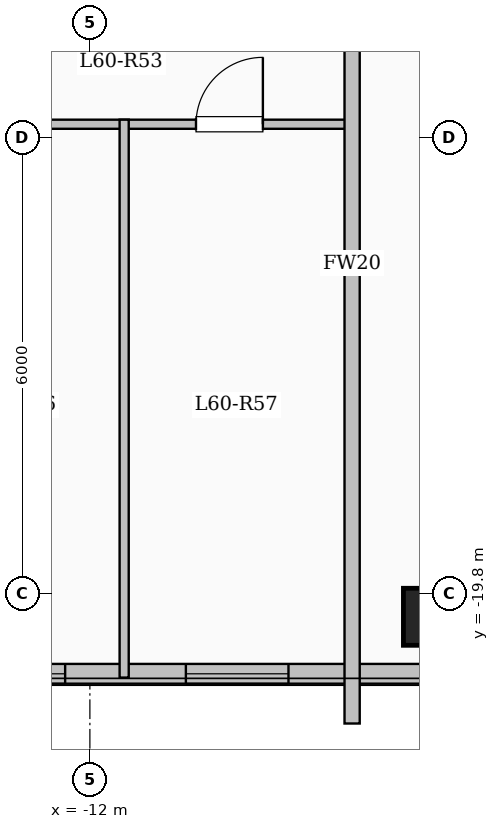
"""IFC4 building model, lengths in metres.
Left out: names, types, materials, properties, quantities, classifications, styles, units other than length and angle.
Written with IfcOpenShell. Run it as: python <this file> out.ifc"""

import sys

from ifc_helpers import new_model, si_unit, direction, frame, frame_2d, origin, origin_2d, place, context, subcontext, project, spatial, rectangle, extrude, element, fill, save


model = new_model("IFC4")
c1 = context("Model", 3, precision=1e-05, world=origin(), true_north=direction((0.0, 1.0)))
c2 = subcontext(c1, "Body", "Model", "MODEL_VIEW")
j1 = project(units=[si_unit("LENGTHUNIT", "METRE"), si_unit("PLANEANGLEUNIT", "RADIAN")], contexts=[c1])
p1 = place(None, origin())
s1 = spatial("IfcSite", under=j1, at=p1, CompositionType="ELEMENT")
p2 = place(p1, origin())
s2 = spatial("IfcBuilding", under=s1, at=p2, CompositionType="ELEMENT")
p3 = place(p2, frame((0.0, 0.0, 220.4)))
s3 = spatial("IfcBuildingStorey", under=s2, at=p3, CompositionType="ELEMENT", Elevation=220.4)
p4 = place(p3, frame((-7.5, -20.1, 0.0), z_axis=(0.0, 0.0, 1.0), x_axis=(1.0, 0.0, 0.0)))
e1 = element("IfcColumn", 1, at=p4, inside=s3, PredefinedType="COLUMN", context=c2, shape_type="SweptSolid", body=[
    extrude(rectangle(XDim=0.75, YDim=0.75, at=origin_2d()), origin(), (0.0, 0.0, 1.0), 3.35),
])
p5 = place(p3, frame((-7.35, -20.85, 0.0), z_axis=(0.0, 0.0, 1.0), x_axis=(-1.0, 0.0, 0.0)))
e2 = element("IfcWall", 2, at=p5, inside=s3, PredefinedType="SOLIDWALL", context=c2, shape_type="SweptSolid", body=[
    extrude(rectangle(XDim=11.1, YDim=0.26, at=frame_2d((5.55, 0.0))), origin(), (0.0, 0.0, 1.0), 3.1),
])
p6 = place(p5, frame((2.037, 0.0, 0.95)))
e3 = element("IfcOpeningElement", 3, at=p6, cuts=e2, PredefinedType="OPENING", context=c2, shape_type="SweptSolid", body=[
    extrude(rectangle(XDim=1.35, YDim=1.55, at=frame_2d((0.675, 0.775))), frame((0.0, 0.14, 0.0), z_axis=(0.0, -1.0, 0.0), x_axis=(1.0, 0.0, 0.0)), (0.0, 0.0, 1.0), 0.28),
])
p7 = place(p5, frame((4.976, 0.0, 0.95)))
e4 = element("IfcOpeningElement", 4, at=p7, cuts=e2, PredefinedType="OPENING", context=c2, shape_type="SweptSolid", body=[
    extrude(rectangle(XDim=1.35, YDim=1.55, at=frame_2d((0.675, 0.775))), frame((0.0, 0.14, 0.0), z_axis=(0.0, -1.0, 0.0), x_axis=(1.0, 0.0, 0.0)), (0.0, 0.0, 1.0), 0.28),
])
p8 = place(p5, frame((8.241, 0.0, 0.9)))
e5 = element("IfcOpeningElement", 5, at=p8, cuts=e2, PredefinedType="OPENING", context=c2, shape_type="SweptSolid", body=[
    extrude(rectangle(XDim=1.65, YDim=1.6, at=frame_2d((0.825, 0.8))), frame((0.0, 0.14, 0.0), z_axis=(0.0, -1.0, 0.0), x_axis=(1.0, 0.0, 0.0)), (0.0, 0.0, 1.0), 0.28),
])
p9 = place(p3, frame((-14.498, -13.62, 0.0), z_axis=(0.0, 0.0, 1.0), x_axis=(1.0, 0.0, 0.0)))
e6 = element("IfcWall", 6, at=p9, inside=s3, PredefinedType="PARTITIONING", context=c2, shape_type="SweptSolid", body=[
    extrude(rectangle(XDim=5.958, YDim=0.12, at=frame_2d((2.979, 0.0))), origin(), (0.0, 0.0, 1.0), 3.1),
])
p10 = place(p9, frame((1.005, 0.0, 0.0)))
e7 = element("IfcOpeningElement", 7, at=p10, cuts=e6, PredefinedType="OPENING", context=c2, shape_type="SweptSolid", body=[
    extrude(rectangle(XDim=0.88, YDim=2.1, at=frame_2d((0.44, 1.05))), frame((0.0, 0.07, 0.0), z_axis=(0.0, -1.0, 0.0), x_axis=(1.0, 0.0, 0.0)), (0.0, 0.0, 1.0), 0.14),
])
p11 = place(p9, frame((3.894, 0.0, 0.0)))
e8 = element("IfcOpeningElement", 8, at=p11, cuts=e6, PredefinedType="OPENING", context=c2, shape_type="SweptSolid", body=[
    extrude(rectangle(XDim=0.88, YDim=2.1, at=frame_2d((0.44, 1.05))), frame((0.0, 0.07, 0.0), z_axis=(0.0, -1.0, 0.0), x_axis=(1.0, 0.0, 0.0)), (0.0, 0.0, 1.0), 0.14),
])
p12 = place(p3, frame((-11.549, -20.9, 0.0), z_axis=(0.0, 0.0, 1.0), x_axis=(0.0, 1.0, 0.0)))
e9 = element("IfcWall", 9, at=p12, inside=s3, PredefinedType="PARTITIONING", context=c2, shape_type="SweptSolid", body=[
    extrude(rectangle(XDim=7.34, YDim=0.12, at=frame_2d((3.67, 0.0))), origin(), (0.0, 0.0, 1.0), 3.1),
])
p13 = place(p3, frame((-8.55, -21.504, 0.0), z_axis=(0.0, 0.0, 1.0), x_axis=(0.0, 1.0, 0.0)))
e10 = element("IfcWall", 10, at=p13, inside=s3, PredefinedType="SOLIDWALL", context=c2, shape_type="SweptSolid", body=[
    extrude(rectangle(XDim=12.104, YDim=0.2, at=frame_2d((6.052, 0.0))), origin(), (0.0, 0.0, 1.0), 3.1),
])
p14 = place(p6, origin())
e11 = element("IfcWindow", 11, at=p14, inside=s3, PartitioningType="SINGLE_PANEL", PredefinedType="WINDOW", context=c2, shape_type="SweptSolid", body=[
    extrude(rectangle(XDim=1.35, YDim=1.55, at=frame_2d((0.675, 0.775))), frame((0.0, 0.03, 0.0), z_axis=(0.0, -1.0, 0.0), x_axis=(1.0, 0.0, 0.0)), (0.0, 0.0, 1.0), 0.06),
])
fill(e3, e11)
p15 = place(p7, origin())
e12 = element("IfcWindow", 12, at=p15, inside=s3, PartitioningType="SINGLE_PANEL", PredefinedType="WINDOW", context=c2, shape_type="SweptSolid", body=[
    extrude(rectangle(XDim=1.35, YDim=1.55, at=frame_2d((0.675, 0.775))), frame((0.0, 0.03, 0.0), z_axis=(0.0, -1.0, 0.0), x_axis=(1.0, 0.0, 0.0)), (0.0, 0.0, 1.0), 0.06),
])
fill(e4, e12)
p16 = place(p11, origin())
e13 = element("IfcDoor", 13, at=p16, inside=s3, OperationType="SINGLE_SWING_RIGHT", PredefinedType="DOOR", context=c2, shape_type="SweptSolid", body=[
    extrude(rectangle(XDim=0.88, YDim=2.1, at=frame_2d((0.44, 1.05))), frame((0.0, 0.025, 0.0), z_axis=(0.0, -1.0, 0.0), x_axis=(1.0, 0.0, 0.0)), (0.0, 0.0, 1.0), 0.05),
])
fill(e8, e13)
save(model, sys.argv[1])
